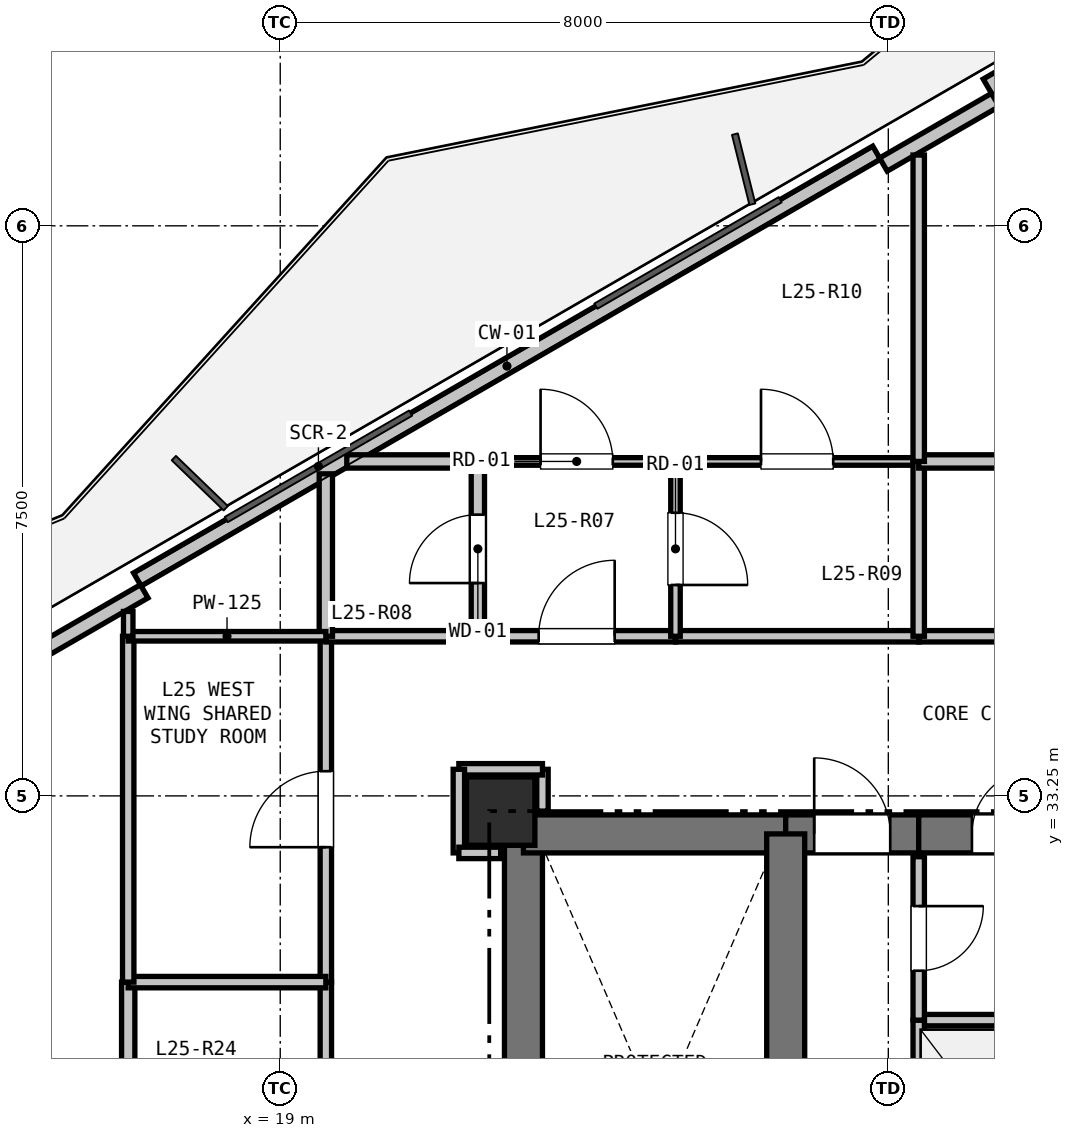
"""IFC4 building model, lengths in metres.
Left out: names, types, materials, properties, quantities, classifications, styles, units other than length and angle.
Written with IfcOpenShell. Run it as: python <this file> out.ifc"""

import sys

from ifc_helpers import new_model, si_unit, direction, frame, frame_2d, origin, origin_2d, place, context, subcontext, project, spatial, rectangle, extrude, element, fill, save


model = new_model("IFC4")
c1 = context("Model", 3, precision=1e-05, world=origin(), true_north=direction((0.0, 1.0)))
c2 = subcontext(c1, "Body", "Model", "MODEL_VIEW")
j1 = project(units=[si_unit("LENGTHUNIT", "METRE"), si_unit("PLANEANGLEUNIT", "RADIAN")], contexts=[c1])
p1 = place(None, origin())
s1 = spatial("IfcSite", under=j1, at=p1, CompositionType="ELEMENT")
p2 = place(p1, origin())
s2 = spatial("IfcBuilding", under=s1, at=p2, CompositionType="ELEMENT")
p3 = place(p2, frame((0.0, 0.0, 93.3)))
s3 = spatial("IfcBuildingStorey", under=s2, at=p3, CompositionType="ELEMENT", Elevation=93.3)
p4 = place(p3, frame((21.9, 33.05, 0.0), z_axis=(0.0, 0.0, 1.0), x_axis=(1.0, 0.0, 0.0)))
e1 = element("IfcColumn", 1, at=p4, inside=s3, PredefinedType="COLUMN", context=c2, shape_type="SweptSolid", body=[
    extrude(rectangle(XDim=0.9, YDim=0.9, at=origin_2d()), origin(), (0.0, 0.0, 1.0), 3.3),
])
p5 = place(p3, frame((17.12, 36.097, 0.0), z_axis=(0.0, 0.0, 1.0), x_axis=(0.866027010039, 0.499997217876, 0.0)))
e2 = element("IfcWall", 2, at=p5, inside=s3, PredefinedType="PARAPET", context=c2, shape_type="SweptSolid", body=[
    extrude(rectangle(XDim=11.229, YDim=0.2, at=frame_2d((5.615, 0.0))), origin(), (0.0, 0.0, 1.0), 0.2),
])
p6 = place(p3, frame((28.317, 42.562, 0.0), z_axis=(0.0, 0.0, 1.0), x_axis=(0.866023023012, 0.500004123596, 0.0)))
e3 = element("IfcWall", 3, at=p6, inside=s3, PredefinedType="SOLIDWALL", context=c2, shape_type="SweptSolid", body=[
    extrude(rectangle(XDim=11.93, YDim=0.275, at=frame_2d((5.965, 0.0))), origin(), (0.0, 0.0, 1.0), 2.67),
])
p7 = place(p6, frame((2.668, 0.0, 0.9)))
e4 = element("IfcOpeningElement", 4, at=p7, cuts=e3, PredefinedType="OPENING", context=c2, shape_type="SweptSolid", body=[
    extrude(rectangle(XDim=2.4, YDim=1.6, at=frame_2d((1.2, 0.8))), frame((0.0, 0.147, 0.0), z_axis=(0.0, -1.0, 0.0), x_axis=(1.0, 0.0, 0.0)), (0.0, 0.0, 1.0), 0.295),
])
p8 = place(p3, frame((15.738, 35.091, 0.0), z_axis=(0.0, 0.0, 1.0), x_axis=(0.866025371046, 0.500000056704, 0.0)))
e5 = element("IfcWall", 5, at=p8, inside=s3, PredefinedType="PARAPET", context=c2, shape_type="SweptSolid", body=[
    extrude(rectangle(XDim=1.7, YDim=0.2, at=frame_2d((0.85, 0.0))), origin(), (0.0, 0.0, 1.0), 2.67),
])
p9 = place(p3, frame((26.935, 41.556, 0.0), z_axis=(0.0, 0.0, 1.0), x_axis=(0.86605165483, 0.499954529098, 0.0)))
e6 = element("IfcWall", 6, at=p9, inside=s3, PredefinedType="PARAPET", context=c2, shape_type="SweptSolid", body=[
    extrude(rectangle(XDim=1.7, YDim=0.2, at=frame_2d((0.85, 0.0))), origin(), (0.0, 0.0, 1.0), 2.67),
])
p10 = place(p3, frame((22.2, 25.4, 0.0), z_axis=(0.0, 0.0, 1.0), x_axis=(0.0, 1.0, 0.0)))
e7 = element("IfcWall", 7, at=p10, inside=s3, PredefinedType="SHEAR", context=c2, shape_type="SweptSolid", body=[
    extrude(rectangle(XDim=7.35, YDim=0.5, at=frame_2d((3.675, 0.0))), origin(), (0.0, 0.0, 1.0), 3.05),
])
p11 = place(p3, frame((22.2, 32.75, 0.0), z_axis=(0.0, 0.0, 1.0), x_axis=(1.0, 0.0, 0.0)))
e8 = element("IfcWall", 8, at=p11, inside=s3, PredefinedType="SHEAR", context=c2, shape_type="SweptSolid", body=[
    extrude(rectangle(XDim=3.45, YDim=0.5, at=frame_2d((1.725, 0.0))), origin(), (0.0, 0.0, 1.0), 3.05),
])
p12 = place(p3, frame((25.65, 32.75, 0.0), z_axis=(0.0, 0.0, 1.0), x_axis=(1.0, 0.0, 0.0)))
e9 = element("IfcWall", 9, at=p12, inside=s3, PredefinedType="SHEAR", context=c2, shape_type="SweptSolid", body=[
    extrude(rectangle(XDim=1.75, YDim=0.5, at=frame_2d((0.875, 0.0))), origin(), (0.0, 0.0, 1.0), 3.05),
])
p13 = place(p12, frame((0.375, 0.0, 0.0)))
e10 = element("IfcOpeningElement", 10, at=p13, cuts=e9, PredefinedType="OPENING", context=c2, shape_type="SweptSolid", body=[
    extrude(rectangle(XDim=1.0, YDim=2.15, at=frame_2d((0.5, 1.075))), frame((0.0, 0.26, 0.0), z_axis=(0.0, -1.0, 0.0), x_axis=(1.0, 0.0, 0.0)), (0.0, 0.0, 1.0), 0.52),
])
p14 = place(p3, frame((27.4, 32.75, 0.0), z_axis=(0.0, 0.0, 1.0), x_axis=(1.0, 0.0, 0.0)))
e11 = element("IfcWall", 11, at=p14, inside=s3, PredefinedType="SHEAR", context=c2, shape_type="SweptSolid", body=[
    extrude(rectangle(XDim=2.25, YDim=0.5, at=frame_2d((1.125, 0.0))), origin(), (0.0, 0.0, 1.0), 3.05),
])
p15 = place(p14, frame((0.7, 0.0, 0.0)))
e12 = element("IfcOpeningElement", 12, at=p15, cuts=e11, PredefinedType="OPENING", context=c2, shape_type="SweptSolid", body=[
    extrude(rectangle(XDim=0.85, YDim=2.1, at=frame_2d((0.425, 1.05))), frame((0.0, 0.26, 0.0), z_axis=(0.0, -1.0, 0.0), x_axis=(1.0, 0.0, 0.0)), (0.0, 0.0, 1.0), 0.52),
])
p16 = place(p3, frame((25.65, 27.95, 0.0), z_axis=(0.0, 0.0, 1.0), x_axis=(0.0, 1.0, 0.0)))
e13 = element("IfcWall", 13, at=p16, inside=s3, PredefinedType="SHEAR", context=c2, shape_type="SweptSolid", body=[
    extrude(rectangle(XDim=4.8, YDim=0.5, at=frame_2d((2.4, 0.0))), origin(), (0.0, 0.0, 1.0), 3.05),
])
p17 = place(p3, frame((27.4, 30.3, 0.0), z_axis=(0.0, 0.0, 1.0), x_axis=(1.0, 0.0, 0.0)))
e14 = element("IfcWall", 14, at=p17, inside=s3, PredefinedType="PARTITIONING", context=c2, shape_type="SweptSolid", body=[
    extrude(rectangle(XDim=1.65, YDim=0.15, at=frame_2d((0.825, 0.0))), origin(), (0.0, 0.0, 1.0), 3.05),
])
p18 = place(p3, frame((27.4, 28.1, 0.0), z_axis=(0.0, 0.0, 1.0), x_axis=(0.0, 1.0, 0.0)))
e15 = element("IfcWall", 15, at=p18, inside=s3, PredefinedType="PARTITIONING", context=c2, shape_type="SweptSolid", body=[
    extrude(rectangle(XDim=2.2, YDim=0.15, at=frame_2d((1.1, 0.0))), origin(), (0.0, 0.0, 1.0), 3.05),
])
p19 = place(p3, frame((27.4, 32.45, 0.0), z_axis=(0.0, 0.0, 1.0), x_axis=(0.0, -1.0, 0.0)))
e16 = element("IfcWall", 16, at=p19, inside=s3, PredefinedType="PARTITIONING", context=c2, shape_type="SweptSolid", body=[
    extrude(rectangle(XDim=2.15, YDim=0.15, at=frame_2d((1.075, 0.0))), origin(), (0.0, 0.0, 1.0), 3.05),
])
p20 = place(p19, frame((0.65, 0.0, 0.0)))
e17 = element("IfcOpeningElement", 17, at=p20, cuts=e16, PredefinedType="OPENING", context=c2, shape_type="SweptSolid", body=[
    extrude(rectangle(XDim=0.85, YDim=2.1, at=frame_2d((0.425, 1.05))), frame((0.0, 0.085, 0.0), z_axis=(0.0, -1.0, 0.0), x_axis=(1.0, 0.0, 0.0)), (0.0, 0.0, 1.0), 0.17),
])
p21 = place(p3, frame((19.6, 28.2, 0.0), z_axis=(0.0, 0.0, 1.0), x_axis=(0.0, 1.0, 0.0)))
e18 = element("IfcWall", 18, at=p21, inside=s3, PredefinedType="PARTITIONING", context=c2, shape_type="SweptSolid", body=[
    extrude(rectangle(XDim=2.6, YDim=0.15, at=frame_2d((1.3, 0.0))), origin(), (0.0, 0.0, 1.0), 3.05),
])
p22 = place(p3, frame((19.6, 30.8, 0.0), z_axis=(0.0, 0.0, 1.0), x_axis=(0.0, 1.0, 0.0)))
e19 = element("IfcWall", 19, at=p22, inside=s3, PredefinedType="PARTITIONING", context=c2, shape_type="SweptSolid", body=[
    extrude(rectangle(XDim=4.55, YDim=0.15, at=frame_2d((2.275, 0.0))), origin(), (0.0, 0.0, 1.0), 2.423),
])
p23 = place(p22, frame((1.775, 0.0, 0.0)))
e20 = element("IfcOpeningElement", 20, at=p23, cuts=e19, PredefinedType="OPENING", context=c2, shape_type="SweptSolid", body=[
    extrude(rectangle(XDim=1.0, YDim=2.15, at=frame_2d((0.5, 1.075))), frame((0.0, 0.085, 0.0), z_axis=(0.0, -1.0, 0.0), x_axis=(1.0, 0.0, 0.0)), (0.0, 0.0, 1.0), 0.17),
])
p24 = place(p3, frame((19.6, 35.35, 0.0), z_axis=(0.0, 0.0, 1.0), x_axis=(1.0, 0.0, 0.0)))
e21 = element("IfcWall", 21, at=p24, inside=s3, PredefinedType="PARTITIONING", context=c2, shape_type="SweptSolid", body=[
    extrude(rectangle(XDim=2.0, YDim=0.15, at=frame_2d((1.0, 0.0))), origin(), (0.0, 0.0, 1.0), 3.05),
])
p25 = place(p3, frame((21.6, 35.35, 0.0), z_axis=(0.0, 0.0, 1.0), x_axis=(1.0, 0.0, 0.0)))
e22 = element("IfcWall", 22, at=p25, inside=s3, PredefinedType="PARTITIONING", context=c2, shape_type="SweptSolid", body=[
    extrude(rectangle(XDim=2.6, YDim=0.15, at=frame_2d((1.3, 0.0))), origin(), (0.0, 0.0, 1.0), 3.05),
])
p26 = place(p25, frame((0.8, 0.0, 0.0)))
e23 = element("IfcOpeningElement", 23, at=p26, cuts=e22, PredefinedType="OPENING", context=c2, shape_type="SweptSolid", body=[
    extrude(rectangle(XDim=1.0, YDim=2.15, at=frame_2d((0.5, 1.075))), frame((0.0, 0.085, 0.0), z_axis=(0.0, -1.0, 0.0), x_axis=(1.0, 0.0, 0.0)), (0.0, 0.0, 1.0), 0.17),
])
p27 = place(p3, frame((24.2, 35.35, 0.0), z_axis=(0.0, 0.0, 1.0), x_axis=(1.0, 0.0, 0.0)))
e24 = element("IfcWall", 24, at=p27, inside=s3, PredefinedType="PARTITIONING", context=c2, shape_type="SweptSolid", body=[
    extrude(rectangle(XDim=3.2, YDim=0.15, at=frame_2d((1.6, 0.0))), origin(), (0.0, 0.0, 1.0), 3.05),
])
p28 = place(p3, frame((27.4, 35.35, 0.0), z_axis=(0.0, 0.0, 1.0), x_axis=(1.0, 0.0, 0.0)))
e25 = element("IfcWall", 25, at=p28, inside=s3, PredefinedType="PARTITIONING", context=c2, shape_type="SweptSolid", body=[
    extrude(rectangle(XDim=2.2, YDim=0.15, at=frame_2d((1.1, 0.0))), origin(), (0.0, 0.0, 1.0), 3.05),
])
p29 = place(p3, frame((22.45, 33.05, 0.0), z_axis=(0.0, 0.0, 1.0), x_axis=(0.0, 1.0, 0.0)))
e26 = element("IfcWall", 26, at=p29, inside=s3, PredefinedType="PARTITIONING", context=c2, shape_type="SweptSolid", body=[
    extrude(rectangle(XDim=0.55, YDim=0.15, at=frame_2d((0.275, 0.0))), origin(), (0.0, 0.0, 1.0), 2.498),
])
p30 = place(p3, frame((22.45, 33.6, 0.0), z_axis=(0.0, 0.0, 1.0), x_axis=(-1.0, 0.0, 0.0)))
e27 = element("IfcWall", 27, at=p30, inside=s3, PredefinedType="PARTITIONING", context=c2, shape_type="SweptSolid", body=[
    extrude(rectangle(XDim=1.1, YDim=0.15, at=frame_2d((0.55, 0.0))), origin(), (0.0, 0.0, 1.0), 3.05),
])
p31 = place(p3, frame((21.35, 33.6, 0.0), z_axis=(0.0, 0.0, 1.0), x_axis=(0.0, -1.0, 0.0)))
e28 = element("IfcWall", 28, at=p31, inside=s3, PredefinedType="PARTITIONING", context=c2, shape_type="SweptSolid", body=[
    extrude(rectangle(XDim=1.1, YDim=0.15, at=frame_2d((0.55, 0.0))), origin(), (0.0, 0.0, 1.0), 2.423),
])
p32 = place(p3, frame((21.35, 32.5, 0.0), z_axis=(0.0, 0.0, 1.0), x_axis=(1.0, 0.0, 0.0)))
e29 = element("IfcWall", 29, at=p32, inside=s3, PredefinedType="PARTITIONING", context=c2, shape_type="SweptSolid", body=[
    extrude(rectangle(XDim=0.55, YDim=0.15, at=frame_2d((0.275, 0.0))), origin(), (0.0, 0.0, 1.0), 2.498),
])
p33 = place(p3, frame((21.6, 37.65, 0.0), z_axis=(0.0, 0.0, 1.0), x_axis=(1.0, 0.0, 0.0)))
e30 = element("IfcWall", 30, at=p33, inside=s3, PredefinedType="PARTITIONING", context=c2, shape_type="SweptSolid", body=[
    extrude(rectangle(XDim=2.6, YDim=0.1, at=frame_2d((1.3, 0.0))), origin(), (0.0, 0.0, 1.0), 3.05),
])
p34 = place(p33, frame((0.825, 0.0, 0.0)))
e31 = element("IfcOpeningElement", 31, at=p34, cuts=e30, PredefinedType="OPENING", context=c2, shape_type="SweptSolid", body=[
    extrude(rectangle(XDim=0.95, YDim=2.1, at=frame_2d((0.475, 1.05))), frame((0.0, 0.06, 0.0), z_axis=(0.0, -1.0, 0.0), x_axis=(1.0, 0.0, 0.0)), (0.0, 0.0, 1.0), 0.12),
])
p35 = place(p3, frame((24.2, 37.65, 0.0), z_axis=(0.0, 0.0, 1.0), x_axis=(0.0, -1.0, 0.0)))
e32 = element("IfcWall", 32, at=p35, inside=s3, PredefinedType="PARTITIONING", context=c2, shape_type="SweptSolid", body=[
    extrude(rectangle(XDim=2.3, YDim=0.125, at=frame_2d((1.15, 0.0))), origin(), (0.0, 0.0, 1.0), 3.05),
])
p36 = place(p35, frame((0.675, 0.0, 0.0)))
e33 = element("IfcOpeningElement", 33, at=p36, cuts=e32, PredefinedType="OPENING", context=c2, shape_type="SweptSolid", body=[
    extrude(rectangle(XDim=0.95, YDim=2.1, at=frame_2d((0.475, 1.05))), frame((0.0, 0.073, 0.0), z_axis=(0.0, -1.0, 0.0), x_axis=(1.0, 0.0, 0.0)), (0.0, 0.0, 1.0), 0.145),
])
p37 = place(p3, frame((21.6, 35.35, 0.0), z_axis=(0.0, 0.0, 1.0), x_axis=(0.0, 1.0, 0.0)))
e34 = element("IfcWall", 34, at=p37, inside=s3, PredefinedType="PLUMBINGWALL", context=c2, shape_type="SweptSolid", body=[
    extrude(rectangle(XDim=2.3, YDim=0.175, at=frame_2d((1.15, 0.0))), origin(), (0.0, 0.0, 1.0), 3.05),
])
p38 = place(p37, frame((0.7, 0.0, 0.0)))
e35 = element("IfcOpeningElement", 35, at=p38, cuts=e34, PredefinedType="OPENING", context=c2, shape_type="SweptSolid", body=[
    extrude(rectangle(XDim=0.9, YDim=2.1, at=frame_2d((0.45, 1.05))), frame((0.0, 0.097, 0.0), z_axis=(0.0, -1.0, 0.0), x_axis=(1.0, 0.0, 0.0)), (0.0, 0.0, 1.0), 0.195),
])
p39 = place(p3, frame((19.6, 35.35, 0.0), z_axis=(0.0, 0.0, 1.0), x_axis=(0.0, 1.0, 0.0)))
e36 = element("IfcWall", 36, at=p39, inside=s3, PredefinedType="PLUMBINGWALL", context=c2, shape_type="SweptSolid", body=[
    extrude(rectangle(XDim=2.137, YDim=0.175, at=frame_2d((1.068, 0.0))), origin(), (0.0, 0.0, 1.0), 2.365),
])
p40 = place(p3, frame((19.875, 37.65, 0.0), z_axis=(0.0, 0.0, 1.0), x_axis=(1.0, 0.0, 0.0)))
e37 = element("IfcWall", 37, at=p40, inside=s3, PredefinedType="PLUMBINGWALL", context=c2, shape_type="SweptSolid", body=[
    extrude(rectangle(XDim=1.725, YDim=0.175, at=frame_2d((0.862, 0.0))), origin(), (0.0, 0.0, 1.0), 2.365),
])
p41 = place(p3, frame((24.2, 37.65, 0.0), z_axis=(0.0, 0.0, 1.0), x_axis=(1.0, 0.0, 0.0)))
e38 = element("IfcWall", 38, at=p41, inside=s3, PredefinedType="PARTITIONING", context=c2, shape_type="SweptSolid", body=[
    extrude(rectangle(XDim=3.2, YDim=0.1, at=frame_2d((1.6, 0.0))), origin(), (0.0, 0.0, 1.0), 3.05),
])
p42 = place(p41, frame((1.125, 0.0, 0.0)))
e39 = element("IfcOpeningElement", 39, at=p42, cuts=e38, PredefinedType="OPENING", context=c2, shape_type="SweptSolid", body=[
    extrude(rectangle(XDim=0.95, YDim=2.1, at=frame_2d((0.475, 1.05))), frame((0.0, 0.06, 0.0), z_axis=(0.0, -1.0, 0.0), x_axis=(1.0, 0.0, 0.0)), (0.0, 0.0, 1.0), 0.12),
])
p43 = place(p3, frame((27.4, 37.65, 0.0), z_axis=(0.0, 0.0, 1.0), x_axis=(0.0, -1.0, 0.0)))
e40 = element("IfcWall", 40, at=p43, inside=s3, PredefinedType="PARTITIONING", context=c2, shape_type="SweptSolid", body=[
    extrude(rectangle(XDim=2.3, YDim=0.15, at=frame_2d((1.15, 0.0))), origin(), (0.0, 0.0, 1.0), 3.05),
])
p44 = place(p3, frame((27.4, 37.65, 0.0), z_axis=(0.0, 0.0, 1.0), x_axis=(1.0, 0.0, 0.0)))
e41 = element("IfcWall", 41, at=p44, inside=s3, PredefinedType="PLUMBINGWALL", context=c2, shape_type="SweptSolid", body=[
    extrude(rectangle(XDim=2.2, YDim=0.175, at=frame_2d((1.1, 0.0))), origin(), (0.0, 0.0, 1.0), 3.05),
])
p45 = place(p3, frame((17.0, 28.2, 0.0), z_axis=(0.0, 0.0, 1.0), x_axis=(0.0, 1.0, 0.0)))
e42 = element("IfcWall", 42, at=p45, inside=s3, PredefinedType="PLUMBINGWALL", context=c2, shape_type="SweptSolid", body=[
    extrude(rectangle(XDim=2.6, YDim=0.175, at=frame_2d((1.3, 0.0))), origin(), (0.0, 0.0, 1.0), 3.05),
])
p46 = place(p3, frame((17.0, 30.8, 0.0), z_axis=(0.0, 0.0, 1.0), x_axis=(1.0, 0.0, 0.0)))
e43 = element("IfcWall", 43, at=p46, inside=s3, PredefinedType="PARTITIONING", context=c2, shape_type="SweptSolid", body=[
    extrude(rectangle(XDim=2.6, YDim=0.15, at=frame_2d((1.3, 0.0))), origin(), (0.0, 0.0, 1.0), 3.05),
])
p47 = place(p3, frame((17.0, 30.8, 0.0), z_axis=(0.0, 0.0, 1.0), x_axis=(0.0, 1.0, 0.0)))
e44 = element("IfcWall", 44, at=p47, inside=s3, PredefinedType="PARTITIONING", context=c2, shape_type="SweptSolid", body=[
    extrude(rectangle(XDim=4.55, YDim=0.15, at=frame_2d((2.275, 0.0))), origin(), (0.0, 0.0, 1.0), 2.365),
])
p48 = place(p3, frame((17.0, 35.35, 0.0), z_axis=(0.0, 0.0, 1.0), x_axis=(1.0, 0.0, 0.0)))
e45 = element("IfcWall", 45, at=p48, inside=s3, PredefinedType="PARTITIONING", context=c2, shape_type="SweptSolid", body=[
    extrude(rectangle(XDim=2.6, YDim=0.125, at=frame_2d((1.3, 0.0))), origin(), (0.0, 0.0, 1.0), 2.365),
])
p49 = place(p3, frame((27.4, 41.681, 0.0), z_axis=(0.0, 0.0, 1.0), x_axis=(0.0, -1.0, 0.0)))
e46 = element("IfcWall", 46, at=p49, inside=s3, PredefinedType="PARTITIONING", context=c2, shape_type="SweptSolid", body=[
    extrude(rectangle(XDim=4.031, YDim=0.15, at=frame_2d((2.016, 0.0))), origin(), (0.0, 0.0, 1.0), 2.365),
])
p50 = place(p3, frame((17.0, 35.677, 0.0), z_axis=(0.0, 0.0, 1.0), x_axis=(0.0, -1.0, 0.0)))
e47 = element("IfcWall", 47, at=p50, inside=s3, PredefinedType="PARTITIONING", context=c2, shape_type="SweptSolid", body=[
    extrude(rectangle(XDim=0.326, YDim=0.125, at=frame_2d((0.163, 0.0))), origin(), (0.0, 0.0, 1.0), 2.365),
])
p51 = place(p13, origin())
e48 = element("IfcDoor", 48, at=p51, inside=s3, OperationType="SINGLE_SWING_LEFT", PredefinedType="DOOR", context=c2, shape_type="SweptSolid", body=[
    extrude(rectangle(XDim=1.0, YDim=2.15, at=frame_2d((0.5, 1.075))), frame((0.0, 0.025, 0.0), z_axis=(0.0, -1.0, 0.0), x_axis=(1.0, 0.0, 0.0)), (0.0, 0.0, 1.0), 0.05),
])
fill(e10, e48)
p52 = place(p20, origin())
e49 = element("IfcDoor", 49, at=p52, inside=s3, OperationType="SINGLE_SWING_LEFT", PredefinedType="DOOR", context=c2, shape_type="SweptSolid", body=[
    extrude(rectangle(XDim=0.85, YDim=2.1, at=frame_2d((0.425, 1.05))), frame((0.0, 0.025, 0.0), z_axis=(0.0, -1.0, 0.0), x_axis=(1.0, 0.0, 0.0)), (0.0, 0.0, 1.0), 0.05),
])
fill(e17, e49)
p53 = place(p26, origin())
e50 = element("IfcDoor", 50, at=p53, inside=s3, OperationType="SINGLE_SWING_RIGHT", PredefinedType="DOOR", context=c2, shape_type="SweptSolid", body=[
    extrude(rectangle(XDim=1.0, YDim=2.15, at=frame_2d((0.5, 1.075))), frame((0.0, 0.025, 0.0), z_axis=(0.0, -1.0, 0.0), x_axis=(1.0, 0.0, 0.0)), (0.0, 0.0, 1.0), 0.05),
])
fill(e23, e50)
p54 = place(p15, origin())
e51 = element("IfcDoor", 51, at=p54, inside=s3, OperationType="SINGLE_SWING_RIGHT", PredefinedType="DOOR", context=c2, shape_type="SweptSolid", body=[
    extrude(rectangle(XDim=0.85, YDim=2.1, at=frame_2d((0.425, 1.05))), frame((0.0, 0.025, 0.0), z_axis=(0.0, -1.0, 0.0), x_axis=(1.0, 0.0, 0.0)), (0.0, 0.0, 1.0), 0.05),
])
fill(e12, e51)
p55 = place(p23, origin())
e52 = element("IfcDoor", 52, at=p55, inside=s3, OperationType="SINGLE_SWING_LEFT", PredefinedType="DOOR", context=c2, shape_type="SweptSolid", body=[
    extrude(rectangle(XDim=1.0, YDim=2.15, at=frame_2d((0.5, 1.075))), frame((0.0, 0.025, 0.0), z_axis=(0.0, -1.0, 0.0), x_axis=(1.0, 0.0, 0.0)), (0.0, 0.0, 1.0), 0.05),
])
fill(e20, e52)
p56 = place(p38, origin())
e53 = element("IfcDoor", 53, at=p56, inside=s3, OperationType="SINGLE_SWING_LEFT", PredefinedType="DOOR", context=c2, shape_type="SweptSolid", body=[
    extrude(rectangle(XDim=0.9, YDim=2.1, at=frame_2d((0.45, 1.05))), frame((0.0, 0.025, 0.0), z_axis=(0.0, -1.0, 0.0), x_axis=(1.0, 0.0, 0.0)), (0.0, 0.0, 1.0), 0.05),
])
fill(e35, e53)
p57 = place(p36, origin())
e54 = element("IfcDoor", 54, at=p57, inside=s3, OperationType="SINGLE_SWING_RIGHT", PredefinedType="DOOR", context=c2, shape_type="SweptSolid", body=[
    extrude(rectangle(XDim=0.95, YDim=2.1, at=frame_2d((0.475, 1.05))), frame((0.0, 0.025, 0.0), z_axis=(0.0, -1.0, 0.0), x_axis=(1.0, 0.0, 0.0)), (0.0, 0.0, 1.0), 0.05),
])
fill(e33, e54)
p58 = place(p34, origin())
e55 = element("IfcDoor", 55, at=p58, inside=s3, OperationType="SINGLE_SWING_LEFT", PredefinedType="DOOR", context=c2, shape_type="SweptSolid", body=[
    extrude(rectangle(XDim=0.95, YDim=2.1, at=frame_2d((0.475, 1.05))), frame((0.0, 0.025, 0.0), z_axis=(0.0, -1.0, 0.0), x_axis=(1.0, 0.0, 0.0)), (0.0, 0.0, 1.0), 0.05),
])
fill(e31, e55)
p59 = place(p42, origin())
e56 = element("IfcDoor", 56, at=p59, inside=s3, OperationType="SINGLE_SWING_LEFT", PredefinedType="DOOR", context=c2, shape_type="SweptSolid", body=[
    extrude(rectangle(XDim=0.95, YDim=2.1, at=frame_2d((0.475, 1.05))), frame((0.0, 0.025, 0.0), z_axis=(0.0, -1.0, 0.0), x_axis=(1.0, 0.0, 0.0)), (0.0, 0.0, 1.0), 0.05),
])
fill(e39, e56)
save(model, sys.argv[1])
